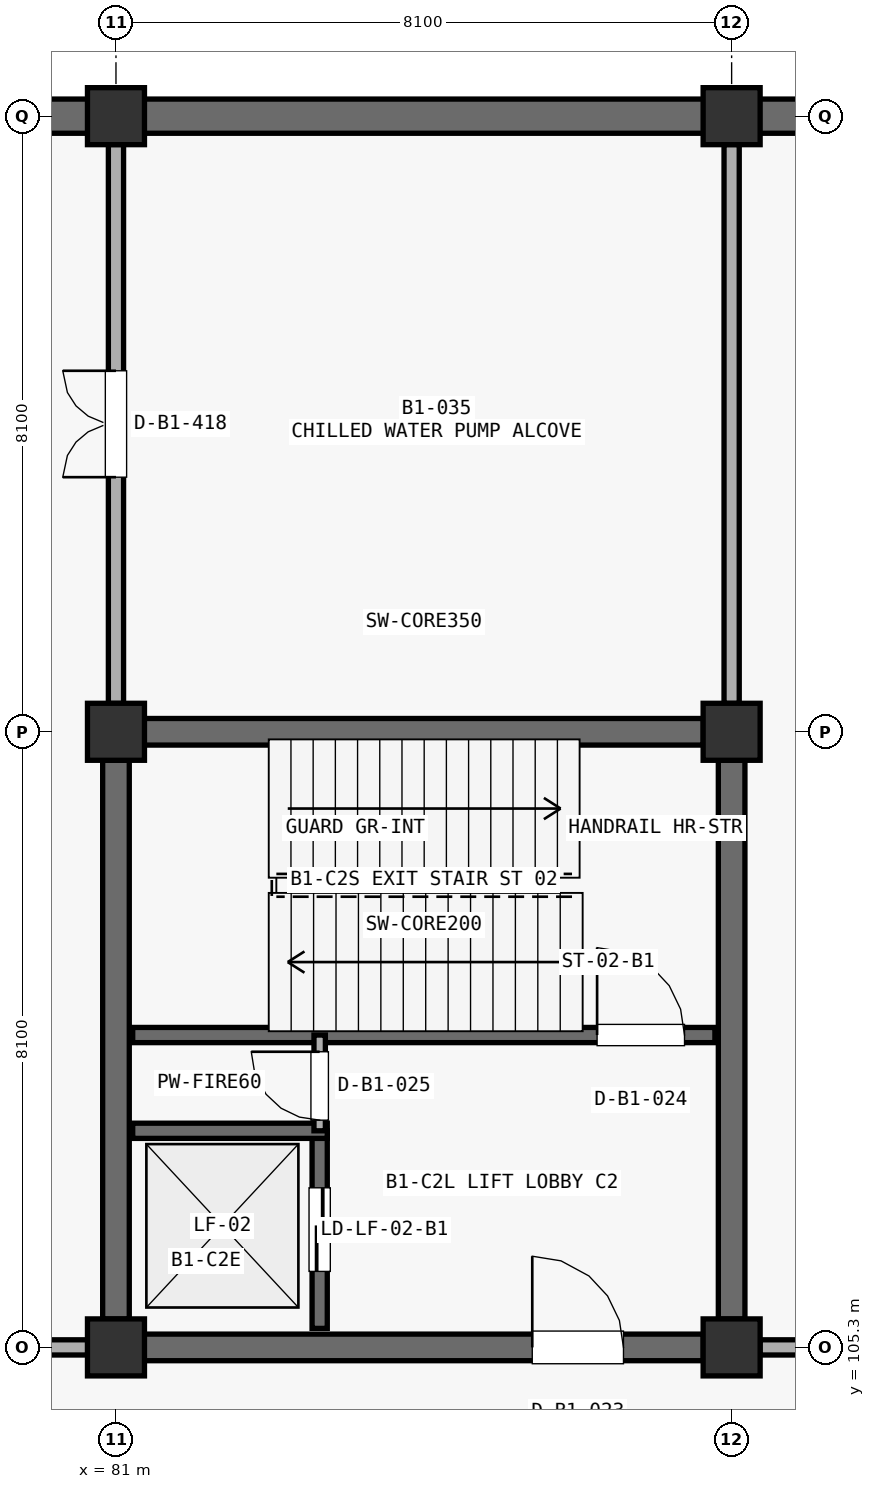
"""IFC4 building model, lengths in metres.
Left out: names, types, materials, properties, quantities, classifications, styles, units other than length and angle.
Written with IfcOpenShell. Run it as: python <this file> out.ifc"""

import sys

from ifc_helpers import new_model, si_unit, direction, frame, frame_2d, origin, origin_2d, place, context, subcontext, project, spatial, rectangle, extrude, element, fill, save


model = new_model("IFC4")
c1 = context("Model", 3, precision=1e-05, world=origin(), true_north=direction((0.0, 1.0)))
c2 = subcontext(c1, "Body", "Model", "MODEL_VIEW")
j1 = project(units=[si_unit("LENGTHUNIT", "METRE"), si_unit("PLANEANGLEUNIT", "RADIAN")], contexts=[c1])
p1 = place(None, origin())
s1 = spatial("IfcSite", under=j1, at=p1, CompositionType="ELEMENT")
p2 = place(p1, origin())
s2 = spatial("IfcBuilding", under=s1, at=p2, CompositionType="ELEMENT")
p3 = place(p2, frame((0.0, 0.0, -5.1)))
s3 = spatial("IfcBuildingStorey", under=s2, at=p3, CompositionType="ELEMENT", Elevation=-5.1)
for number, where, z_axis, x_axis in (
    (1, (81.0, 105.3, 0.0), (0.0, 0.0, 1.0), (1.0, 0.0, 0.0)),
    (2, (81.0, 113.4, 0.0), (0.0, 0.0, 1.0), (1.0, 0.0, 0.0)),
    (3, (81.0, 121.5, 0.0), (0.0, 0.0, 1.0), (1.0, 0.0, 0.0)),
    (4, (89.1, 105.3, 0.0), (0.0, 0.0, 1.0), (1.0, 0.0, 0.0)),
    (5, (89.1, 113.4, 0.0), (0.0, 0.0, 1.0), (1.0, 0.0, 0.0)),
    (6, (89.1, 121.5, 0.0), (0.0, 0.0, 1.0), (1.0, 0.0, 0.0)),
):
    element("IfcColumn", number, at=place(p3, frame(where, z_axis=z_axis, x_axis=x_axis)), inside=s3, PredefinedType="COLUMN", context=c2, shape_type="SweptSolid", body=[
        extrude(rectangle(XDim=0.75, YDim=0.75, at=origin_2d()), origin(), (0.0, 0.0, 1.0), 5.1),
    ])
p4 = place(p3, frame((73.26, 121.5, 0.0), z_axis=(0.0, 0.0, 1.0), x_axis=(1.0, 0.0, 0.0)))
e7 = element("IfcWall", 7, at=p4, inside=s3, PredefinedType="SOLIDWALL", context=c2, shape_type="SweptSolid", body=[
    extrude(rectangle(XDim=7.38, YDim=0.45, at=frame_2d((3.69, 0.0))), origin(), (0.0, 0.0, 1.0), 4.365),
])
p5 = place(p3, frame((81.36, 121.5, 0.0), z_axis=(0.0, 0.0, 1.0), x_axis=(1.0, 0.0, 0.0)))
e8 = element("IfcWall", 8, at=p5, inside=s3, PredefinedType="SOLIDWALL", context=c2, shape_type="SweptSolid", body=[
    extrude(rectangle(XDim=7.38, YDim=0.45, at=frame_2d((3.69, 0.0))), origin(), (0.0, 0.0, 1.0), 4.03),
])
p6 = place(p3, frame((89.46, 121.5, 0.0), z_axis=(0.0, 0.0, 1.0), x_axis=(1.0, 0.0, 0.0)))
e9 = element("IfcWall", 9, at=p6, inside=s3, PredefinedType="SOLIDWALL", context=c2, shape_type="SweptSolid", body=[
    extrude(rectangle(XDim=7.38, YDim=0.45, at=frame_2d((3.69, 0.0))), origin(), (0.0, 0.0, 1.0), 4.13),
])
for number, where, z_axis, x_axis in (
    (10, (81.373, 113.4, 0.0), (0.0, 0.0, 1.0), (1.0, 0.0, 0.0)),
    (11, (81.0, 105.673, 0.0), (0.0, 0.0, 1.0), (0.0, 1.0, 0.0)),
    (12, (89.1, 105.673, 0.0), (0.0, 0.0, 1.0), (0.0, 1.0, 0.0)),
):
    element("IfcWall", number, at=place(p3, frame(where, z_axis=z_axis, x_axis=x_axis)), inside=s3, PredefinedType="SHEAR", context=c2, shape_type="SweptSolid", body=[
        extrude(rectangle(XDim=7.354, YDim=0.35, at=frame_2d((3.677, 0.0))), origin(), (0.0, 0.0, 1.0), 4.782),
    ])
p7 = place(p3, frame((81.373, 105.3, 0.0), z_axis=(0.0, 0.0, 1.0), x_axis=(1.0, 0.0, 0.0)))
e13 = element("IfcWall", 13, at=p7, inside=s3, PredefinedType="SHEAR", context=c2, shape_type="SweptSolid", body=[
    extrude(rectangle(XDim=7.354, YDim=0.35, at=frame_2d((3.677, 0.0))), origin(), (0.0, 0.0, 1.0), 4.782),
])
p8 = place(p7, frame((5.104, 0.0, 0.0)))
e14 = element("IfcOpeningElement", 14, at=p8, cuts=e13, PredefinedType="OPENING", context=c2, shape_type="SweptSolid", body=[
    extrude(rectangle(XDim=1.2, YDim=2.2, at=frame_2d((0.6, 1.1))), frame((0.0, 0.185, 0.0), z_axis=(0.0, -1.0, 0.0), x_axis=(1.0, 0.0, 0.0)), (0.0, 0.0, 1.0), 0.37),
])
p9 = place(p3, frame((81.22, 109.41, 0.0), z_axis=(0.0, 0.0, 1.0), x_axis=(1.0, 0.0, 0.0)))
e15 = element("IfcWall", 15, at=p9, inside=s3, PredefinedType="SHEAR", context=c2, shape_type="SweptSolid", body=[
    extrude(rectangle(XDim=7.66, YDim=0.2, at=frame_2d((3.83, 0.0))), origin(), (0.0, 0.0, 1.0), 4.782),
])
p10 = place(p9, frame((6.11, 0.0, 0.0)))
e16 = element("IfcOpeningElement", 16, at=p10, cuts=e15, PredefinedType="OPENING", context=c2, shape_type="SweptSolid", body=[
    extrude(rectangle(XDim=1.15, YDim=2.2, at=frame_2d((0.575, 1.1))), frame((0.0, 0.11, 0.0), z_axis=(0.0, -1.0, 0.0), x_axis=(1.0, 0.0, 0.0)), (0.0, 0.0, 1.0), 0.22),
])
p11 = place(p3, frame((83.68, 105.55, 0.0), z_axis=(0.0, 0.0, 1.0), x_axis=(0.0, 1.0, 0.0)))
e17 = element("IfcWall", 17, at=p11, inside=s3, PredefinedType="SHEAR", context=c2, shape_type="SweptSolid", body=[
    extrude(rectangle(XDim=2.6, YDim=0.2, at=frame_2d((1.3, 0.0))), origin(), (0.0, 0.0, 1.0), 4.782),
])
p12 = place(p11, frame((0.75, 0.0, 0.0)))
e18 = element("IfcOpeningElement", 18, at=p12, cuts=e17, PredefinedType="OPENING", context=c2, shape_type="SweptSolid", body=[
    extrude(rectangle(XDim=1.1, YDim=2.2, at=frame_2d((0.55, 1.1))), frame((0.0, 0.11, 0.0), z_axis=(0.0, -1.0, 0.0), x_axis=(1.0, 0.0, 0.0)), (0.0, 0.0, 1.0), 0.22),
])
p13 = place(p3, frame((81.22, 108.15, 0.0), z_axis=(0.0, 0.0, 1.0), x_axis=(1.0, 0.0, 0.0)))
e19 = element("IfcWall", 19, at=p13, inside=s3, PredefinedType="SHEAR", context=c2, shape_type="SweptSolid", body=[
    extrude(rectangle(XDim=2.56, YDim=0.2, at=frame_2d((1.28, 0.0))), origin(), (0.0, 0.0, 1.0), 4.782),
])
p14 = place(p3, frame((83.68, 108.15, 0.0), z_axis=(0.0, 0.0, 1.0), x_axis=(0.0, 1.0, 0.0)))
e20 = element("IfcWall", 20, at=p14, inside=s3, PredefinedType="PARTITIONING", context=c2, shape_type="SweptSolid", body=[
    extrude(rectangle(XDim=1.26, YDim=0.15, at=frame_2d((0.63, 0.0))), origin(), (0.0, 0.0, 1.0), 4.782),
])
p15 = place(p14, frame((0.14, 0.0, 0.0)))
e21 = element("IfcOpeningElement", 21, at=p15, cuts=e20, PredefinedType="OPENING", context=c2, shape_type="SweptSolid", body=[
    extrude(rectangle(XDim=0.9, YDim=2.15, at=frame_2d((0.45, 1.075))), frame((0.0, 0.085, 0.0), z_axis=(0.0, -1.0, 0.0), x_axis=(1.0, 0.0, 0.0)), (0.0, 0.0, 1.0), 0.17),
])
p16 = place(p3, frame((73.273, 105.3, 0.0), z_axis=(0.0, 0.0, 1.0), x_axis=(1.0, 0.0, 0.0)))
e22 = element("IfcWall", 22, at=p16, inside=s3, PredefinedType="PARTITIONING", context=c2, shape_type="SweptSolid", body=[
    extrude(rectangle(XDim=7.354, YDim=0.2, at=frame_2d((3.677, 0.0))), origin(), (0.0, 0.0, 1.0), 4.182),
])
p17 = place(p3, frame((81.0, 113.773, 0.0), z_axis=(0.0, 0.0, 1.0), x_axis=(0.0, 1.0, 0.0)))
e23 = element("IfcWall", 23, at=p17, inside=s3, PredefinedType="PARTITIONING", context=c2, shape_type="SweptSolid", body=[
    extrude(rectangle(XDim=7.354, YDim=0.2, at=frame_2d((3.677, 0.0))), origin(), (0.0, 0.0, 1.0), 3.832),
])
p18 = place(p17, frame((2.977, 0.0, 0.0)))
e24 = element("IfcOpeningElement", 24, at=p18, cuts=e23, PredefinedType="OPENING", context=c2, shape_type="SweptSolid", body=[
    extrude(rectangle(XDim=1.4, YDim=2.2, at=frame_2d((0.7, 1.1))), frame((0.0, 0.11, 0.0), z_axis=(0.0, -1.0, 0.0), x_axis=(1.0, 0.0, 0.0)), (0.0, 0.0, 1.0), 0.22),
])
p19 = place(p3, frame((89.473, 105.3, 0.0), z_axis=(0.0, 0.0, 1.0), x_axis=(1.0, 0.0, 0.0)))
e25 = element("IfcWall", 25, at=p19, inside=s3, PredefinedType="PARTITIONING", context=c2, shape_type="SweptSolid", body=[
    extrude(rectangle(XDim=7.354, YDim=0.2, at=frame_2d((3.677, 0.0))), origin(), (0.0, 0.0, 1.0), 3.832),
])
p20 = place(p19, frame((2.977, 0.0, 0.0)))
e26 = element("IfcOpeningElement", 26, at=p20, cuts=e25, PredefinedType="OPENING", context=c2, shape_type="SweptSolid", body=[
    extrude(rectangle(XDim=1.4, YDim=2.2, at=frame_2d((0.7, 1.1))), frame((0.0, 0.11, 0.0), z_axis=(0.0, -1.0, 0.0), x_axis=(1.0, 0.0, 0.0)), (0.0, 0.0, 1.0), 0.22),
])
p21 = place(p3, frame((89.1, 113.773, 0.0), z_axis=(0.0, 0.0, 1.0), x_axis=(0.0, 1.0, 0.0)))
e27 = element("IfcWall", 27, at=p21, inside=s3, PredefinedType="PARTITIONING", context=c2, shape_type="SweptSolid", body=[
    extrude(rectangle(XDim=7.354, YDim=0.2, at=frame_2d((3.677, 0.0))), origin(), (0.0, 0.0, 1.0), 4.132),
])
p22 = place(p8, origin())
e28 = element("IfcDoor", 28, at=p22, inside=s3, OperationType="SINGLE_SWING_LEFT", PredefinedType="DOOR", context=c2, shape_type="SweptSolid", body=[
    extrude(rectangle(XDim=1.2, YDim=2.2, at=frame_2d((0.6, 1.1))), frame((0.0, 0.025, 0.0), z_axis=(0.0, -1.0, 0.0), x_axis=(1.0, 0.0, 0.0)), (0.0, 0.0, 1.0), 0.05),
])
fill(e14, e28)
p23 = place(p10, origin())
e29 = element("IfcDoor", 29, at=p23, inside=s3, OperationType="SINGLE_SWING_LEFT", PredefinedType="DOOR", context=c2, shape_type="SweptSolid", body=[
    extrude(rectangle(XDim=1.15, YDim=2.2, at=frame_2d((0.575, 1.1))), frame((0.0, 0.025, 0.0), z_axis=(0.0, -1.0, 0.0), x_axis=(1.0, 0.0, 0.0)), (0.0, 0.0, 1.0), 0.05),
])
fill(e16, e29)
p24 = place(p12, origin())
e30 = element("IfcDoor", 30, at=p24, inside=s3, OperationType="SLIDING_TO_LEFT", PredefinedType="DOOR", context=c2, shape_type="SweptSolid", body=[
    extrude(rectangle(XDim=1.1, YDim=2.2, at=frame_2d((0.55, 1.1))), frame((0.0, 0.025, 0.0), z_axis=(0.0, -1.0, 0.0), x_axis=(1.0, 0.0, 0.0)), (0.0, 0.0, 1.0), 0.05),
])
fill(e18, e30)
p25 = place(p15, origin())
e31 = element("IfcDoor", 31, at=p25, inside=s3, OperationType="SINGLE_SWING_RIGHT", PredefinedType="DOOR", context=c2, shape_type="SweptSolid", body=[
    extrude(rectangle(XDim=0.9, YDim=2.15, at=frame_2d((0.45, 1.075))), frame((0.0, 0.025, 0.0), z_axis=(0.0, -1.0, 0.0), x_axis=(1.0, 0.0, 0.0)), (0.0, 0.0, 1.0), 0.05),
])
fill(e21, e31)
p26 = place(p18, origin())
e32 = element("IfcDoor", 32, at=p26, inside=s3, OperationType="DOUBLE_SWING_LEFT", PredefinedType="DOOR", context=c2, shape_type="SweptSolid", body=[
    extrude(rectangle(XDim=1.4, YDim=2.2, at=frame_2d((0.7, 1.1))), frame((0.0, 0.025, 0.0), z_axis=(0.0, -1.0, 0.0), x_axis=(1.0, 0.0, 0.0)), (0.0, 0.0, 1.0), 0.05),
])
fill(e24, e32)
save(model, sys.argv[1])
